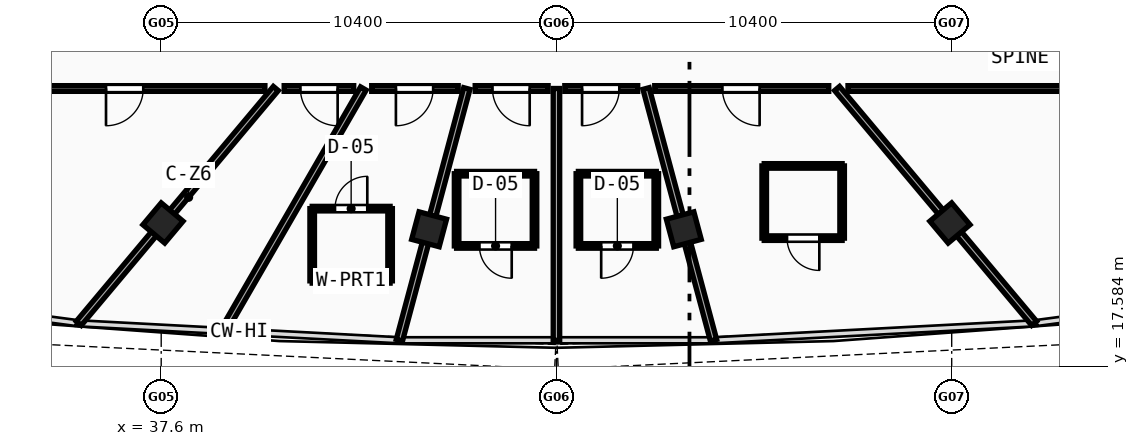
"""IFC4 building model, lengths in metres.
Left out: names, types, materials, properties, quantities, classifications, styles, units other than length and angle.
Written with IfcOpenShell. Run it as: python <this file> out.ifc"""

import sys

from ifc_helpers import new_model, si_unit, direction, frame, frame_2d, origin, origin_with_axes, origin_2d, place, context, subcontext, project, spatial, rectangle, hollow_rectangle, extrude, source, transform, mapped, element, fill, save


model = new_model("IFC4")
c1 = context("Model", 3, precision=1e-05, world=origin(), true_north=direction((0.0, 1.0)))
c2 = subcontext(c1, "Body", "Model", "MODEL_VIEW")
j1 = project(units=[si_unit("LENGTHUNIT", "METRE"), si_unit("PLANEANGLEUNIT", "RADIAN")], contexts=[c1])
p1 = place(None, origin())
s1 = spatial("IfcSite", under=j1, at=p1, CompositionType="ELEMENT")
p2 = place(p1, origin())
s2 = spatial("IfcBuilding", under=s1, at=p2, CompositionType="ELEMENT")
p3 = place(p2, frame((0.0, 0.0, 285.02)))
s3 = spatial("IfcBuildingStorey", under=s2, at=p3, CompositionType="ELEMENT", Elevation=285.02)
m1 = source(origin(), c2, "Body", "SweptSolid", [
    extrude(hollow_rectangle(XDim=0.75, YDim=0.75, WallThickness=0.028, at=origin_2d()), origin(), (0.0, 0.0, 1.0), 3.73),
])
for number, where, z_axis, x_axis in (
    (1, (37.647, 21.362, -0.26), (0.0, 0.0, 1.0), (0.766, -0.643, 0.0)),
    (2, (44.649, 21.196, -0.26), (0.0, 0.0, 1.0), (0.966, -0.259, 0.0)),
    (3, (51.351, 21.196, -0.26), (0.0, 0.0, 1.0), (0.966, 0.259, 0.0)),
    (4, (58.354, 21.362, -0.26), (0.0, 0.0, 1.0), (0.766, 0.643, 0.0)),
):
    element("IfcColumn", number, at=place(p3, frame(where, z_axis=z_axis, x_axis=x_axis)), inside=s3, PredefinedType="COLUMN", context=c2, shape_type="MappedRepresentation", body=[
        mapped(m1, transform((0.0, 0.0, 0.0), scale=1.0)),
    ])
p4 = place(p3, frame((40.616, 24.9, 0.0), z_axis=(0.0, 0.0, 1.0), x_axis=(-0.642788791497, -0.76604345146, 0.0)))
e5 = element("IfcWall", 5, at=p4, inside=s3, PredefinedType="PARTITIONING", context=c2, shape_type="SweptSolid", body=[
    extrude(rectangle(XDim=8.066, YDim=0.17, at=frame_2d((4.033, 0.0))), origin(), (0.0, 0.0, 1.0), 2.87),
])
p5 = place(p3, frame((42.919, 24.9, 0.0), z_axis=(0.0, 0.0, 1.0), x_axis=(-0.499992114976, -0.866029956157, 0.0)))
e6 = element("IfcWall", 6, at=p5, inside=s3, PredefinedType="PARTITIONING", context=c2, shape_type="SweptSolid", body=[
    extrude(rectangle(XDim=7.367, YDim=0.17, at=frame_2d((3.683, 0.0))), origin(), (0.0, 0.0, 1.0), 2.87),
])
p6 = place(p3, frame((45.642, 24.9, 0.0), z_axis=(0.0, 0.0, 1.0), x_axis=(-0.258825643191, -0.965924058312, 0.0)))
e7 = element("IfcWall", 7, at=p6, inside=s3, PredefinedType="PARTITIONING", context=c2, shape_type="SweptSolid", body=[
    extrude(rectangle(XDim=6.858, YDim=0.17, at=frame_2d((3.429, 0.0))), origin(), (0.0, 0.0, 1.0), 2.87),
])
p7 = place(p3, frame((48.0, 24.9, 0.0), z_axis=(0.0, 0.0, 1.0), x_axis=(0.0, -1.0, 0.0)))
e8 = element("IfcWall", 8, at=p7, inside=s3, PredefinedType="PARTITIONING", context=c2, shape_type="SweptSolid", body=[
    extrude(rectangle(XDim=6.625, YDim=0.17, at=frame_2d((3.312, 0.0))), origin(), (0.0, 0.0, 1.0), 2.87),
])
p8 = place(p3, frame((50.358, 24.9, 0.0), z_axis=(0.0, 0.0, 1.0), x_axis=(0.258825643191, -0.965924058312, 0.0)))
e9 = element("IfcWall", 9, at=p8, inside=s3, PredefinedType="PARTITIONING", context=c2, shape_type="SweptSolid", body=[
    extrude(rectangle(XDim=6.858, YDim=0.17, at=frame_2d((3.429, 0.0))), origin(), (0.0, 0.0, 1.0), 2.87),
])
p9 = place(p3, frame((55.384, 24.9, 0.0), z_axis=(0.0, 0.0, 1.0), x_axis=(0.642788791497, -0.76604345146, 0.0)))
e10 = element("IfcWall", 10, at=p9, inside=s3, PredefinedType="PARTITIONING", context=c2, shape_type="SweptSolid", body=[
    extrude(rectangle(XDim=8.066, YDim=0.17, at=frame_2d((4.033, 0.0))), origin(), (0.0, 0.0, 1.0), 2.87),
])
p10 = place(p3, frame((62.85, 24.9, 0.0), z_axis=(0.0, 0.0, 1.0), x_axis=(-1.0, 0.0, 0.0)))
e11 = element("IfcWall", 11, at=p10, inside=s3, PredefinedType="PARTITIONING", context=c2, shape_type="SweptSolid", body=[
    extrude(rectangle(XDim=7.179, YDim=0.15, at=frame_2d((3.589, 0.0))), origin(), (0.0, 0.0, 1.0), 3.12),
])
p11 = place(p3, frame((55.164, 24.9, 0.0), z_axis=(0.0, 0.0, 1.0), x_axis=(-1.0, 0.0, 0.0)))
e12 = element("IfcWall", 12, at=p11, inside=s3, PredefinedType="PARTITIONING", context=c2, shape_type="SweptSolid", body=[
    extrude(rectangle(XDim=4.579, YDim=0.15, at=frame_2d((2.289, 0.0))), origin(), (0.0, 0.0, 1.0), 3.47),
])
p12 = place(p11, frame((1.818, 0.0, 0.0)))
e13 = element("IfcOpeningElement", 13, at=p12, cuts=e12, PredefinedType="OPENING", context=c2, shape_type="SweptSolid", body=[
    extrude(rectangle(XDim=0.98, YDim=2.12, at=frame_2d((0.49, 1.06))), frame((0.0, 0.085, 0.0), z_axis=(0.0, -1.0, 0.0), x_axis=(1.0, 0.0, 0.0)), (0.0, 0.0, 1.0), 0.17),
])
p13 = place(p3, frame((50.138, 24.9, 0.0), z_axis=(0.0, 0.0, 1.0), x_axis=(-1.0, 0.0, 0.0)))
e14 = element("IfcWall", 14, at=p13, inside=s3, PredefinedType="PARTITIONING", context=c2, shape_type="SweptSolid", body=[
    extrude(rectangle(XDim=1.918, YDim=0.15, at=frame_2d((0.959, 0.0))), origin(), (0.0, 0.0, 1.0), 3.12),
])
p14 = place(p13, frame((0.484, 0.0, 0.0)))
e15 = element("IfcOpeningElement", 15, at=p14, cuts=e14, PredefinedType="OPENING", context=c2, shape_type="SweptSolid", body=[
    extrude(rectangle(XDim=0.98, YDim=2.12, at=frame_2d((0.49, 1.06))), frame((0.0, 0.085, 0.0), z_axis=(0.0, -1.0, 0.0), x_axis=(1.0, 0.0, 0.0)), (0.0, 0.0, 1.0), 0.17),
])
p15 = place(p3, frame((47.78, 24.9, 0.0), z_axis=(0.0, 0.0, 1.0), x_axis=(-1.0, 0.0, 0.0)))
e16 = element("IfcWall", 16, at=p15, inside=s3, PredefinedType="PARTITIONING", context=c2, shape_type="SweptSolid", body=[
    extrude(rectangle(XDim=1.918, YDim=0.15, at=frame_2d((0.959, 0.0))), origin(), (0.0, 0.0, 1.0), 3.12),
])
p16 = place(p15, frame((0.484, 0.0, 0.0)))
e17 = element("IfcOpeningElement", 17, at=p16, cuts=e16, PredefinedType="OPENING", context=c2, shape_type="SweptSolid", body=[
    extrude(rectangle(XDim=0.98, YDim=2.12, at=frame_2d((0.49, 1.06))), frame((0.0, 0.085, 0.0), z_axis=(0.0, -1.0, 0.0), x_axis=(1.0, 0.0, 0.0)), (0.0, 0.0, 1.0), 0.17),
])
p17 = place(p3, frame((45.414, 24.9, 0.0), z_axis=(0.0, 0.0, 1.0), x_axis=(-1.0, 0.0, 0.0)))
e18 = element("IfcWall", 18, at=p17, inside=s3, PredefinedType="PARTITIONING", context=c2, shape_type="SweptSolid", body=[
    extrude(rectangle(XDim=2.275, YDim=0.15, at=frame_2d((1.138, 0.0))), origin(), (0.0, 0.0, 1.0), 3.47),
])
p18 = place(p17, frame((0.658, 0.0, 0.0)))
e19 = element("IfcOpeningElement", 19, at=p18, cuts=e18, PredefinedType="OPENING", context=c2, shape_type="SweptSolid", body=[
    extrude(rectangle(XDim=0.98, YDim=2.12, at=frame_2d((0.49, 1.06))), frame((0.0, 0.085, 0.0), z_axis=(0.0, -1.0, 0.0), x_axis=(1.0, 0.0, 0.0)), (0.0, 0.0, 1.0), 0.17),
])
p19 = place(p3, frame((42.665, 24.9, 0.0), z_axis=(0.0, 0.0, 1.0), x_axis=(-1.0, 0.0, 0.0)))
e20 = element("IfcWall", 20, at=p19, inside=s3, PredefinedType="PARTITIONING", context=c2, shape_type="SweptSolid", body=[
    extrude(rectangle(XDim=1.83, YDim=0.15, at=frame_2d((0.915, 0.0))), origin(), (0.0, 0.0, 1.0), 3.47),
])
p20 = place(p19, frame((0.423, 0.0, 0.0)))
e21 = element("IfcOpeningElement", 21, at=p20, cuts=e20, PredefinedType="OPENING", context=c2, shape_type="SweptSolid", body=[
    extrude(rectangle(XDim=0.98, YDim=2.12, at=frame_2d((0.49, 1.06))), frame((0.0, 0.085, 0.0), z_axis=(0.0, -1.0, 0.0), x_axis=(1.0, 0.0, 0.0)), (0.0, 0.0, 1.0), 0.17),
])
p21 = place(p3, frame((40.329, 24.9, 0.0), z_axis=(0.0, 0.0, 1.0), x_axis=(-1.0, 0.0, 0.0)))
e22 = element("IfcWall", 22, at=p21, inside=s3, PredefinedType="PARTITIONING", context=c2, shape_type="SweptSolid", body=[
    extrude(rectangle(XDim=7.179, YDim=0.15, at=frame_2d((3.589, 0.0))), origin(), (0.0, 0.0, 1.0), 3.12),
])
p22 = place(p21, frame((3.201, 0.0, 0.0)))
e23 = element("IfcOpeningElement", 23, at=p22, cuts=e22, PredefinedType="OPENING", context=c2, shape_type="SweptSolid", body=[
    extrude(rectangle(XDim=0.98, YDim=2.12, at=frame_2d((0.49, 1.06))), frame((0.0, 0.085, 0.0), z_axis=(0.0, -1.0, 0.0), x_axis=(1.0, 0.0, 0.0)), (0.0, 0.0, 1.0), 0.17),
])
p23 = place(p3, frame((41.573, 19.839, 0.0), z_axis=(0.0, 0.0, 1.0), x_axis=(1.0, 0.0, 0.0)))
e24 = element("IfcWall", 24, at=p23, inside=s3, PredefinedType="PARTITIONING", context=c2, shape_type="SweptSolid", body=[
    extrude(rectangle(XDim=2.05, YDim=0.12, at=frame_2d((1.025, 0.0))), origin(), (0.0, 0.0, 1.0), 3.47),
])
p24 = place(p3, frame((43.623, 19.839, 0.0), z_axis=(0.0, 0.0, 1.0), x_axis=(0.0, 1.0, 0.0)))
e25 = element("IfcWall", 25, at=p24, inside=s3, PredefinedType="PARTITIONING", context=c2, shape_type="SweptSolid", body=[
    extrude(rectangle(XDim=1.9, YDim=0.12, at=frame_2d((0.95, 0.0))), origin(), (0.0, 0.0, 1.0), 2.87),
])
p25 = place(p3, frame((43.623, 21.739, 0.0), z_axis=(0.0, 0.0, 1.0), x_axis=(-1.0, 0.0, 0.0)))
e26 = element("IfcWall", 26, at=p25, inside=s3, PredefinedType="PARTITIONING", context=c2, shape_type="SweptSolid", body=[
    extrude(rectangle(XDim=2.05, YDim=0.12, at=frame_2d((1.025, 0.0))), origin(), (0.0, 0.0, 1.0), 3.47),
])
p26 = place(p25, frame((0.6, 0.0, 0.0)))
e27 = element("IfcOpeningElement", 27, at=p26, cuts=e26, PredefinedType="OPENING", context=c2, shape_type="SweptSolid", body=[
    extrude(rectangle(XDim=0.85, YDim=2.1, at=frame_2d((0.425, 1.05))), frame((0.0, 0.07, 0.0), z_axis=(0.0, -1.0, 0.0), x_axis=(1.0, 0.0, 0.0)), (0.0, 0.0, 1.0), 0.14),
])
p27 = place(p3, frame((41.573, 21.739, 0.0), z_axis=(0.0, 0.0, 1.0), x_axis=(0.0, -1.0, 0.0)))
e28 = element("IfcWall", 28, at=p27, inside=s3, PredefinedType="PARTITIONING", context=c2, shape_type="SweptSolid", body=[
    extrude(rectangle(XDim=1.9, YDim=0.12, at=frame_2d((0.95, 0.0))), origin(), (0.0, 0.0, 1.0), 2.87),
])
p28 = place(p3, frame((45.373, 20.758, 0.0), z_axis=(0.0, 0.0, 1.0), x_axis=(1.0, 0.0, 0.0)))
e29 = element("IfcWall", 29, at=p28, inside=s3, PredefinedType="PARTITIONING", context=c2, shape_type="SweptSolid", body=[
    extrude(rectangle(XDim=2.05, YDim=0.12, at=frame_2d((1.025, 0.0))), origin(), (0.0, 0.0, 1.0), 3.47),
])
p29 = place(p28, frame((0.6, 0.0, 0.0)))
e30 = element("IfcOpeningElement", 30, at=p29, cuts=e29, PredefinedType="OPENING", context=c2, shape_type="SweptSolid", body=[
    extrude(rectangle(XDim=0.85, YDim=2.1, at=frame_2d((0.425, 1.05))), frame((0.0, 0.07, 0.0), z_axis=(0.0, -1.0, 0.0), x_axis=(1.0, 0.0, 0.0)), (0.0, 0.0, 1.0), 0.14),
])
p30 = place(p3, frame((47.423, 20.758, 0.0), z_axis=(0.0, 0.0, 1.0), x_axis=(0.0, 1.0, 0.0)))
e31 = element("IfcWall", 31, at=p30, inside=s3, PredefinedType="PARTITIONING", context=c2, shape_type="SweptSolid", body=[
    extrude(rectangle(XDim=1.9, YDim=0.12, at=frame_2d((0.95, 0.0))), origin(), (0.0, 0.0, 1.0), 2.87),
])
p31 = place(p3, frame((47.423, 22.658, 0.0), z_axis=(0.0, 0.0, 1.0), x_axis=(-1.0, 0.0, 0.0)))
e32 = element("IfcWall", 32, at=p31, inside=s3, PredefinedType="PARTITIONING", context=c2, shape_type="SweptSolid", body=[
    extrude(rectangle(XDim=2.05, YDim=0.12, at=frame_2d((1.025, 0.0))), origin(), (0.0, 0.0, 1.0), 3.47),
])
p32 = place(p3, frame((45.373, 22.658, 0.0), z_axis=(0.0, 0.0, 1.0), x_axis=(0.0, -1.0, 0.0)))
e33 = element("IfcWall", 33, at=p32, inside=s3, PredefinedType="PARTITIONING", context=c2, shape_type="SweptSolid", body=[
    extrude(rectangle(XDim=1.9, YDim=0.12, at=frame_2d((0.95, 0.0))), origin(), (0.0, 0.0, 1.0), 2.87),
])
p33 = place(p3, frame((48.577, 20.758, 0.0), z_axis=(0.0, 0.0, 1.0), x_axis=(1.0, 0.0, 0.0)))
e34 = element("IfcWall", 34, at=p33, inside=s3, PredefinedType="PARTITIONING", context=c2, shape_type="SweptSolid", body=[
    extrude(rectangle(XDim=2.05, YDim=0.12, at=frame_2d((1.025, 0.0))), origin(), (0.0, 0.0, 1.0), 3.47),
])
p34 = place(p33, frame((0.6, 0.0, 0.0)))
e35 = element("IfcOpeningElement", 35, at=p34, cuts=e34, PredefinedType="OPENING", context=c2, shape_type="SweptSolid", body=[
    extrude(rectangle(XDim=0.85, YDim=2.1, at=frame_2d((0.425, 1.05))), frame((0.0, 0.07, 0.0), z_axis=(0.0, -1.0, 0.0), x_axis=(1.0, 0.0, 0.0)), (0.0, 0.0, 1.0), 0.14),
])
p35 = place(p3, frame((50.627, 20.758, 0.0), z_axis=(0.0, 0.0, 1.0), x_axis=(0.0, 1.0, 0.0)))
e36 = element("IfcWall", 36, at=p35, inside=s3, PredefinedType="PARTITIONING", context=c2, shape_type="SweptSolid", body=[
    extrude(rectangle(XDim=1.9, YDim=0.12, at=frame_2d((0.95, 0.0))), origin(), (0.0, 0.0, 1.0), 2.87),
])
p36 = place(p3, frame((50.627, 22.658, 0.0), z_axis=(0.0, 0.0, 1.0), x_axis=(-1.0, 0.0, 0.0)))
e37 = element("IfcWall", 37, at=p36, inside=s3, PredefinedType="PARTITIONING", context=c2, shape_type="SweptSolid", body=[
    extrude(rectangle(XDim=2.05, YDim=0.12, at=frame_2d((1.025, 0.0))), origin(), (0.0, 0.0, 1.0), 3.47),
])
p37 = place(p3, frame((48.577, 22.658, 0.0), z_axis=(0.0, 0.0, 1.0), x_axis=(0.0, -1.0, 0.0)))
e38 = element("IfcWall", 38, at=p37, inside=s3, PredefinedType="PARTITIONING", context=c2, shape_type="SweptSolid", body=[
    extrude(rectangle(XDim=1.9, YDim=0.12, at=frame_2d((0.95, 0.0))), origin(), (0.0, 0.0, 1.0), 2.87),
])
p38 = place(p3, frame((53.467, 20.963, 0.0), z_axis=(0.0, 0.0, 1.0), x_axis=(1.0, 0.0, 0.0)))
e39 = element("IfcWall", 39, at=p38, inside=s3, PredefinedType="PARTITIONING", context=c2, shape_type="SweptSolid", body=[
    extrude(rectangle(XDim=2.05, YDim=0.12, at=frame_2d((1.025, 0.0))), origin(), (0.0, 0.0, 1.0), 3.47),
])
p39 = place(p38, frame((0.6, 0.0, 0.0)))
e40 = element("IfcOpeningElement", 40, at=p39, cuts=e39, PredefinedType="OPENING", context=c2, shape_type="SweptSolid", body=[
    extrude(rectangle(XDim=0.85, YDim=2.1, at=frame_2d((0.425, 1.05))), frame((0.0, 0.07, 0.0), z_axis=(0.0, -1.0, 0.0), x_axis=(1.0, 0.0, 0.0)), (0.0, 0.0, 1.0), 0.14),
])
p40 = place(p3, frame((55.517, 20.963, 0.0), z_axis=(0.0, 0.0, 1.0), x_axis=(0.0, 1.0, 0.0)))
e41 = element("IfcWall", 41, at=p40, inside=s3, PredefinedType="PARTITIONING", context=c2, shape_type="SweptSolid", body=[
    extrude(rectangle(XDim=1.9, YDim=0.12, at=frame_2d((0.95, 0.0))), origin(), (0.0, 0.0, 1.0), 2.87),
])
p41 = place(p3, frame((55.517, 22.863, 0.0), z_axis=(0.0, 0.0, 1.0), x_axis=(-1.0, 0.0, 0.0)))
e42 = element("IfcWall", 42, at=p41, inside=s3, PredefinedType="PARTITIONING", context=c2, shape_type="SweptSolid", body=[
    extrude(rectangle(XDim=2.05, YDim=0.12, at=frame_2d((1.025, 0.0))), origin(), (0.0, 0.0, 1.0), 3.47),
])
p42 = place(p3, frame((53.467, 22.863, 0.0), z_axis=(0.0, 0.0, 1.0), x_axis=(0.0, -1.0, 0.0)))
e43 = element("IfcWall", 43, at=p42, inside=s3, PredefinedType="PARTITIONING", context=c2, shape_type="SweptSolid", body=[
    extrude(rectangle(XDim=1.9, YDim=0.12, at=frame_2d((0.95, 0.0))), origin(), (0.0, 0.0, 1.0), 2.87),
])
m2 = source(origin(), c2, "Body", "SweptSolid", [
    extrude(rectangle(XDim=0.98, YDim=2.12, at=frame_2d((0.49, 1.06))), frame((0.0, 0.025, 0.0), z_axis=(0.0, -1.0, 0.0), x_axis=(1.0, 0.0, 0.0)), (0.0, 0.0, 1.0), 0.05),
])
p43 = place(p22, origin_with_axes())
e44 = element("IfcDoor", 44, at=p43, inside=s3, OperationType="SINGLE_SWING_RIGHT", PredefinedType="DOOR", context=c2, shape_type="MappedRepresentation", body=[
    mapped(m2, transform((0.0, 0.0, 0.0), scale=1.0)),
])
fill(e23, e44)
p44 = place(p20, origin_with_axes())
e45 = element("IfcDoor", 45, at=p44, inside=s3, OperationType="SINGLE_SWING_LEFT", PredefinedType="DOOR", context=c2, shape_type="MappedRepresentation", body=[
    mapped(m2, transform((0.0, 0.0, 0.0), scale=1.0)),
])
fill(e21, e45)
p45 = place(p18, origin_with_axes())
e46 = element("IfcDoor", 46, at=p45, inside=s3, OperationType="SINGLE_SWING_RIGHT", PredefinedType="DOOR", context=c2, shape_type="MappedRepresentation", body=[
    mapped(m2, transform((0.0, 0.0, 0.0), scale=1.0)),
])
fill(e19, e46)
m3 = source(origin(), c2, "Body", "SweptSolid", [
    extrude(rectangle(XDim=0.85, YDim=2.1, at=frame_2d((0.425, 1.05))), frame((0.0, 0.025, 0.0), z_axis=(0.0, -1.0, 0.0), x_axis=(1.0, 0.0, 0.0)), (0.0, 0.0, 1.0), 0.05),
])
p46 = place(p26, frame((0.85, 0.0, 0.0), z_axis=(0.0, 0.0, 1.0), x_axis=(-1.0, 0.0, 0.0)))
e47 = element("IfcDoor", 47, at=p46, inside=s3, OperationType="SINGLE_SWING_RIGHT", PredefinedType="DOOR", context=c2, shape_type="MappedRepresentation", body=[
    mapped(m3, transform((0.0, 0.0, 0.0), scale=1.0)),
])
fill(e27, e47)
p47 = place(p16, origin_with_axes())
e48 = element("IfcDoor", 48, at=p47, inside=s3, OperationType="SINGLE_SWING_LEFT", PredefinedType="DOOR", context=c2, shape_type="MappedRepresentation", body=[
    mapped(m2, transform((0.0, 0.0, 0.0), scale=1.0)),
])
fill(e17, e48)
p48 = place(p29, frame((0.85, 0.0, 0.0), z_axis=(0.0, 0.0, 1.0), x_axis=(-1.0, 0.0, 0.0)))
e49 = element("IfcDoor", 49, at=p48, inside=s3, OperationType="SINGLE_SWING_LEFT", PredefinedType="DOOR", context=c2, shape_type="MappedRepresentation", body=[
    mapped(m3, transform((0.0, 0.0, 0.0), scale=1.0)),
])
fill(e30, e49)
p49 = place(p14, origin_with_axes())
e50 = element("IfcDoor", 50, at=p49, inside=s3, OperationType="SINGLE_SWING_RIGHT", PredefinedType="DOOR", context=c2, shape_type="MappedRepresentation", body=[
    mapped(m2, transform((0.0, 0.0, 0.0), scale=1.0)),
])
fill(e15, e50)
p50 = place(p34, frame((0.85, 0.0, 0.0), z_axis=(0.0, 0.0, 1.0), x_axis=(-1.0, 0.0, 0.0)))
e51 = element("IfcDoor", 51, at=p50, inside=s3, OperationType="SINGLE_SWING_RIGHT", PredefinedType="DOOR", context=c2, shape_type="MappedRepresentation", body=[
    mapped(m3, transform((0.0, 0.0, 0.0), scale=1.0)),
])
fill(e35, e51)
p51 = place(p12, origin_with_axes())
e52 = element("IfcDoor", 52, at=p51, inside=s3, OperationType="SINGLE_SWING_LEFT", PredefinedType="DOOR", context=c2, shape_type="MappedRepresentation", body=[
    mapped(m2, transform((0.0, 0.0, 0.0), scale=1.0)),
])
fill(e13, e52)
p52 = place(p39, frame((0.85, 0.0, 0.0), z_axis=(0.0, 0.0, 1.0), x_axis=(-1.0, 0.0, 0.0)))
e53 = element("IfcDoor", 53, at=p52, inside=s3, OperationType="SINGLE_SWING_LEFT", PredefinedType="DOOR", context=c2, shape_type="MappedRepresentation", body=[
    mapped(m3, transform((0.0, 0.0, 0.0), scale=1.0)),
])
fill(e40, e53)
save(model, sys.argv[1])
